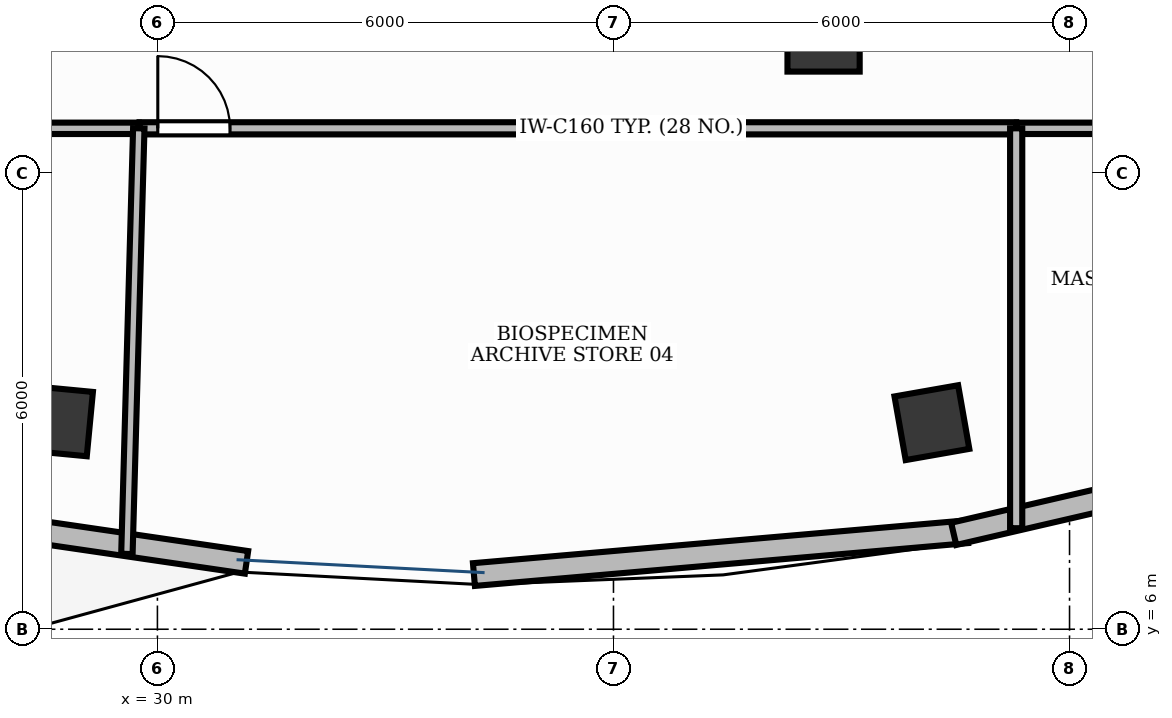
"""IFC4 building model, lengths in metres.
Left out: names, types, materials, properties, quantities, classifications, styles, units other than length and angle.
Written with IfcOpenShell. Run it as: python <this file> out.ifc"""

import sys

from ifc_helpers import new_model, si_unit, direction, frame, frame_2d, origin, origin_2d, place, context, subcontext, project, spatial, rectangle, extrude, element, fill, save


model = new_model("IFC4")
c1 = context("Model", 3, precision=1e-05, world=origin(), true_north=direction((0.0, 1.0)))
c2 = subcontext(c1, "Body", "Model", "MODEL_VIEW")
j1 = project(units=[si_unit("LENGTHUNIT", "METRE"), si_unit("PLANEANGLEUNIT", "RADIAN")], contexts=[c1])
p1 = place(None, origin())
s1 = spatial("IfcSite", under=j1, at=p1, CompositionType="ELEMENT")
p2 = place(p1, origin())
s2 = spatial("IfcBuilding", under=s1, at=p2, CompositionType="ELEMENT")
p3 = place(p2, frame((0.0, 0.0, 264.6)))
s3 = spatial("IfcBuildingStorey", under=s2, at=p3, CompositionType="ELEMENT", Elevation=264.6)
for number, where, z_axis, x_axis in (
    (1, (28.688, 8.739, -0.0), (0.0, 0.0, 1.0), (-0.995, 0.095, 0.0)),
    (2, (40.189, 8.718, -0.0), (0.0, 0.0, 1.0), (0.985, 0.173, 0.0)),
):
    element("IfcColumn", number, at=place(p3, frame(where, z_axis=z_axis, x_axis=x_axis)), inside=s3, PredefinedType="COLUMN", context=c2, shape_type="SweptSolid", body=[
        extrude(rectangle(XDim=0.85, YDim=0.85, at=origin_2d()), origin(), (0.0, 0.0, 1.0), 3.901),
    ])
p4 = place(p3, frame((38.764, 13.811, -0.0), z_axis=(0.0, 0.0, 1.0), x_axis=(1.0, 0.0, 0.0)))
e3 = element("IfcColumn", 3, at=p4, inside=s3, PredefinedType="COLUMN", context=c2, shape_type="SweptSolid", body=[
    extrude(rectangle(XDim=0.95, YDim=0.95, at=origin_2d()), origin(), (0.0, 0.0, 1.0), 3.901),
])
p5 = place(p3, frame((27.879, 7.362, 0.0), z_axis=(0.0, 0.0, 1.0), x_axis=(0.989457987501, -0.144820202219, 0.0)))
e4 = element("IfcWall", 4, at=p5, inside=s3, PredefinedType="STANDARD", context=c2, shape_type="SweptSolid", body=[
    extrude(rectangle(XDim=3.328, YDim=0.3, at=frame_2d((1.664, 0.0))), origin(), (0.0, 0.0, 1.0), 3.9),
])
p6 = place(p3, frame((34.164, 6.719, 0.0), z_axis=(0.0, 0.0, 1.0), x_axis=(0.996250708408, 0.086513155053, 0.0)))
e5 = element("IfcWall", 5, at=p6, inside=s3, PredefinedType="STANDARD", context=c2, shape_type="SweptSolid", body=[
    extrude(rectangle(XDim=6.513, YDim=0.3, at=frame_2d((3.257, 0.0))), origin(), (0.0, 0.0, 1.0), 3.9),
])
p7 = place(p3, frame((40.476, 7.255, 0.0), z_axis=(0.0, 0.0, 1.0), x_axis=(0.974177266996, 0.225784526637, 0.0)))
e6 = element("IfcWall", 6, at=p7, inside=s3, PredefinedType="STANDARD", context=c2, shape_type="SweptSolid", body=[
    extrude(rectangle(XDim=3.296, YDim=0.3, at=frame_2d((1.648, 0.0))), origin(), (0.0, 0.0, 1.0), 3.9),
])
p8 = place(p3, frame((20.114, 12.59, 0.0), z_axis=(0.0, 0.0, 1.0), x_axis=(1.0, 0.0, 0.0)))
e7 = element("IfcWall", 7, at=p8, inside=s3, PredefinedType="PARTITIONING", context=c2, shape_type="SweptSolid", body=[
    extrude(rectangle(XDim=9.641, YDim=0.15, at=frame_2d((4.82, 0.0))), origin(), (0.0, 0.0, 1.0), 2.91),
])
p9 = place(p8, frame((4.689, 0.0, 0.0)))
e8 = element("IfcOpeningElement", 8, at=p9, cuts=e7, PredefinedType="OPENING", context=c2, shape_type="SweptSolid", body=[
    extrude(rectangle(XDim=0.95, YDim=2.15, at=frame_2d((0.475, 1.075))), frame((0.0, 0.09, 0.0), z_axis=(0.0, -1.0, 0.0), x_axis=(1.0, 0.0, 0.0)), (0.0, 0.0, 1.0), 0.18),
])
p10 = place(p3, frame((29.765, 12.59, 0.0), z_axis=(0.0, 0.0, 1.0), x_axis=(1.0, 0.0, 0.0)))
e9 = element("IfcWall", 9, at=p10, inside=s3, PredefinedType="PARTITIONING", context=c2, shape_type="SweptSolid", body=[
    extrude(rectangle(XDim=11.533, YDim=0.16, at=frame_2d((5.767, 0.0))), origin(), (0.0, 0.0, 1.0), 2.91),
])
p11 = place(p10, frame((0.24, 0.0, 0.0)))
e10 = element("IfcOpeningElement", 10, at=p11, cuts=e9, PredefinedType="OPENING", context=c2, shape_type="SweptSolid", body=[
    extrude(rectangle(XDim=0.95, YDim=2.15, at=frame_2d((0.475, 1.075))), frame((0.0, 0.095, 0.0), z_axis=(0.0, -1.0, 0.0), x_axis=(1.0, 0.0, 0.0)), (0.0, 0.0, 1.0), 0.19),
])
p12 = place(p3, frame((41.308, 12.59, 0.0), z_axis=(0.0, 0.0, 1.0), x_axis=(1.0, 0.0, 0.0)))
e11 = element("IfcWall", 11, at=p12, inside=s3, PredefinedType="PARTITIONING", context=c2, shape_type="SweptSolid", body=[
    extrude(rectangle(XDim=3.192, YDim=0.15, at=frame_2d((1.596, 0.0))), origin(), (0.0, 0.0, 1.0), 2.91),
])
p13 = place(p12, frame((2.002, 0.0, 0.0)))
e12 = element("IfcOpeningElement", 12, at=p13, cuts=e11, PredefinedType="OPENING", context=c2, shape_type="SweptSolid", body=[
    extrude(rectangle(XDim=0.95, YDim=2.15, at=frame_2d((0.475, 1.075))), frame((0.0, 0.09, 0.0), z_axis=(0.0, -1.0, 0.0), x_axis=(1.0, 0.0, 0.0)), (0.0, 0.0, 1.0), 0.18),
])
p14 = place(p3, frame((29.755, 12.59, 0.0), z_axis=(0.0, 0.0, 1.0), x_axis=(-0.02789409051, -0.999610884152, 0.0)))
e13 = element("IfcWall", 13, at=p14, inside=s3, PredefinedType="PARTITIONING", context=c2, shape_type="SweptSolid", body=[
    extrude(rectangle(XDim=5.602, YDim=0.15, at=frame_2d((2.801, 0.0))), origin(), (0.0, 0.0, 1.0), 2.91),
])
p15 = place(p3, frame((41.298, 12.59, 0.0), z_axis=(0.0, 0.0, 1.0), x_axis=(0.0, -1.0, 0.0)))
e14 = element("IfcWall", 14, at=p15, inside=s3, PredefinedType="PARTITIONING", context=c2, shape_type="SweptSolid", body=[
    extrude(rectangle(XDim=5.261, YDim=0.16, at=frame_2d((2.63, 0.0))), origin(), (0.0, 0.0, 1.0), 2.91),
])
p16 = place(p11, origin())
e15 = element("IfcDoor", 15, at=p16, inside=s3, OperationType="SINGLE_SWING_LEFT", PredefinedType="DOOR", context=c2, shape_type="SweptSolid", body=[
    extrude(rectangle(XDim=0.95, YDim=2.15, at=frame_2d((0.475, 1.075))), frame((0.0, 0.025, 0.0), z_axis=(0.0, -1.0, 0.0), x_axis=(1.0, 0.0, 0.0)), (0.0, 0.0, 1.0), 0.05),
])
fill(e10, e15)
save(model, sys.argv[1])
